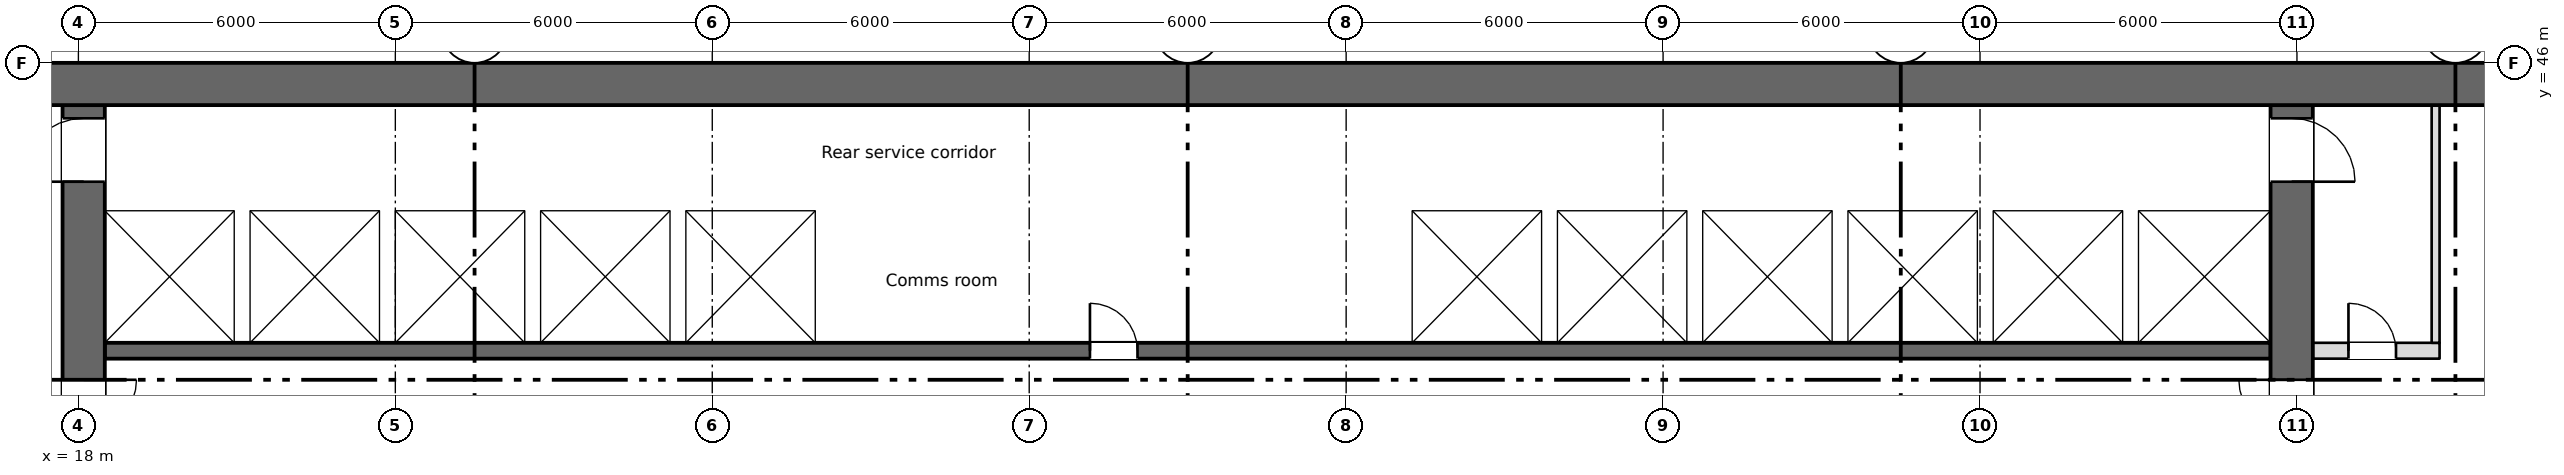
"""IFC4 building model, lengths in metres.
Left out: names, types, materials, properties, quantities, classifications, styles, units other than length and angle.
Written with IfcOpenShell. Run it as: python <this file> out.ifc"""

import sys

from ifc_helpers import new_model, si_unit, direction, frame, frame_2d, origin, place, context, subcontext, project, spatial, rectangle, extrude, element, fill, save


model = new_model("IFC4")
c1 = context("Model", 3, precision=1e-05, world=origin(), true_north=direction((0.0, 1.0)))
c2 = subcontext(c1, "Body", "Model", "MODEL_VIEW")
j1 = project(units=[si_unit("LENGTHUNIT", "METRE"), si_unit("PLANEANGLEUNIT", "RADIAN")], contexts=[c1])
p1 = place(None, origin())
s1 = spatial("IfcSite", under=j1, at=p1, CompositionType="ELEMENT")
p2 = place(p1, origin())
s2 = spatial("IfcBuilding", under=s1, at=p2, CompositionType="ELEMENT")
p3 = place(p2, frame((0.0, 0.0, 147.5)))
s3 = spatial("IfcBuildingStorey", under=s2, at=p3, CompositionType="ELEMENT", Elevation=147.5)
p4 = place(p3, frame((5.55, 45.6, 0.0), z_axis=(0.0, 0.0, 1.0), x_axis=(1.0, 0.0, 0.0)))
e1 = element("IfcWall", 1, at=p4, inside=s3, PredefinedType="SHEAR", context=c2, shape_type="SweptSolid", body=[
    extrude(rectangle(XDim=60.9, YDim=0.8, at=frame_2d((30.45, 0.0))), origin(), (0.0, 0.0, 1.0), 3.35),
])
p5 = place(p4, frame((1.2, 0.0, 0.6)))
e2 = element("IfcOpeningElement", 2, at=p5, cuts=e1, PredefinedType="OPENING", context=c2, shape_type="SweptSolid", body=[
    extrude(rectangle(XDim=0.6, YDim=2.4, at=frame_2d((0.3, 1.2))), frame((0.0, 0.41, 0.0), z_axis=(0.0, -1.0, 0.0), x_axis=(1.0, 0.0, 0.0)), (0.0, 0.0, 1.0), 0.82),
])
p6 = place(p4, frame((7.2, 0.0, 0.6)))
e3 = element("IfcOpeningElement", 3, at=p6, cuts=e1, PredefinedType="OPENING", context=c2, shape_type="SweptSolid", body=[
    extrude(rectangle(XDim=0.6, YDim=2.4, at=frame_2d((0.3, 1.2))), frame((0.0, 0.41, 0.0), z_axis=(0.0, -1.0, 0.0), x_axis=(1.0, 0.0, 0.0)), (0.0, 0.0, 1.0), 0.82),
])
p7 = place(p3, frame((18.1, 28.4, 0.0), z_axis=(0.0, 0.0, 1.0), x_axis=(0.0, 1.0, 0.0)))
e4 = element("IfcWall", 4, at=p7, inside=s3, PredefinedType="SHEAR", context=c2, shape_type="SweptSolid", body=[
    extrude(rectangle(XDim=16.8, YDim=0.8, at=frame_2d((8.4, 0.0))), origin(), (0.0, 0.0, 1.0), 3.35),
])
p8 = place(p7, frame((9.6, 0.0, 0.0)))
e5 = element("IfcOpeningElement", 5, at=p8, cuts=e4, PredefinedType="OPENING", context=c2, shape_type="SweptSolid", body=[
    extrude(rectangle(XDim=2.0, YDim=2.1, at=frame_2d((1.0, 1.05))), frame((0.0, 0.41, 0.0), z_axis=(0.0, -1.0, 0.0), x_axis=(1.0, 0.0, 0.0)), (0.0, 0.0, 1.0), 0.82),
])
p9 = place(p7, frame((15.35, 0.0, 0.0)))
e6 = element("IfcOpeningElement", 6, at=p9, cuts=e4, PredefinedType="OPENING", context=c2, shape_type="SweptSolid", body=[
    extrude(rectangle(XDim=1.2, YDim=2.1, at=frame_2d((0.6, 1.05))), frame((0.0, 0.41, 0.0), z_axis=(0.0, -1.0, 0.0), x_axis=(1.0, 0.0, 0.0)), (0.0, 0.0, 1.0), 0.82),
])
p10 = place(p3, frame((59.9, 28.4, 0.0), z_axis=(0.0, 0.0, 1.0), x_axis=(0.0, 1.0, 0.0)))
e7 = element("IfcWall", 7, at=p10, inside=s3, PredefinedType="SHEAR", context=c2, shape_type="SweptSolid", body=[
    extrude(rectangle(XDim=16.8, YDim=0.8, at=frame_2d((8.4, 0.0))), origin(), (0.0, 0.0, 1.0), 3.35),
])
p11 = place(p10, frame((9.6, 0.0, 0.0)))
e8 = element("IfcOpeningElement", 8, at=p11, cuts=e7, PredefinedType="OPENING", context=c2, shape_type="SweptSolid", body=[
    extrude(rectangle(XDim=2.0, YDim=2.1, at=frame_2d((1.0, 1.05))), frame((0.0, 0.41, 0.0), z_axis=(0.0, -1.0, 0.0), x_axis=(1.0, 0.0, 0.0)), (0.0, 0.0, 1.0), 0.82),
])
p12 = place(p10, frame((15.35, 0.0, 0.0)))
e9 = element("IfcOpeningElement", 9, at=p12, cuts=e7, PredefinedType="OPENING", context=c2, shape_type="SweptSolid", body=[
    extrude(rectangle(XDim=1.2, YDim=2.1, at=frame_2d((0.6, 1.05))), frame((0.0, 0.41, 0.0), z_axis=(0.0, -1.0, 0.0), x_axis=(1.0, 0.0, 0.0)), (0.0, 0.0, 1.0), 0.82),
])
p13 = place(p3, frame((18.5, 40.55, 0.0), z_axis=(0.0, 0.0, 1.0), x_axis=(1.0, 0.0, 0.0)))
e10 = element("IfcWall", 10, at=p13, inside=s3, PredefinedType="SHEAR", context=c2, shape_type="SweptSolid", body=[
    extrude(rectangle(XDim=41.0, YDim=0.3, at=frame_2d((20.5, 0.0))), origin(), (0.0, 0.0, 1.0), 3.35),
])
p14 = place(p13, frame((18.65, 0.0, 0.0)))
e11 = element("IfcOpeningElement", 11, at=p14, cuts=e10, PredefinedType="OPENING", context=c2, shape_type="SweptSolid", body=[
    extrude(rectangle(XDim=0.9, YDim=2.1, at=frame_2d((0.45, 1.05))), frame((0.0, 0.16, 0.0), z_axis=(0.0, -1.0, 0.0), x_axis=(1.0, 0.0, 0.0)), (0.0, 0.0, 1.0), 0.32),
])
p15 = place(p13, frame((6.175, 0.0, 0.0)))
e12 = element("IfcOpeningElement", 12, at=p15, cuts=e10, PredefinedType="OPENING", context=c2, shape_type="SweptSolid", body=[
    extrude(rectangle(XDim=1.1, YDim=2.1, at=frame_2d((0.55, 1.05))), frame((0.0, 0.16, 0.0), z_axis=(0.0, -1.0, 0.0), x_axis=(1.0, 0.0, 0.0)), (0.0, 0.0, 1.0), 0.32),
])
p16 = place(p13, frame((8.925, 0.0, 0.0)))
e13 = element("IfcOpeningElement", 13, at=p16, cuts=e10, PredefinedType="OPENING", context=c2, shape_type="SweptSolid", body=[
    extrude(rectangle(XDim=1.1, YDim=2.1, at=frame_2d((0.55, 1.05))), frame((0.0, 0.16, 0.0), z_axis=(0.0, -1.0, 0.0), x_axis=(1.0, 0.0, 0.0)), (0.0, 0.0, 1.0), 0.32),
])
p17 = place(p13, frame((11.675, 0.0, 0.0)))
e14 = element("IfcOpeningElement", 14, at=p17, cuts=e10, PredefinedType="OPENING", context=c2, shape_type="SweptSolid", body=[
    extrude(rectangle(XDim=1.1, YDim=2.1, at=frame_2d((0.55, 1.05))), frame((0.0, 0.16, 0.0), z_axis=(0.0, -1.0, 0.0), x_axis=(1.0, 0.0, 0.0)), (0.0, 0.0, 1.0), 0.32),
])
p18 = place(p13, frame((30.925, 0.0, 0.0)))
e15 = element("IfcOpeningElement", 15, at=p18, cuts=e10, PredefinedType="OPENING", context=c2, shape_type="SweptSolid", body=[
    extrude(rectangle(XDim=1.1, YDim=2.1, at=frame_2d((0.55, 1.05))), frame((0.0, 0.16, 0.0), z_axis=(0.0, -1.0, 0.0), x_axis=(1.0, 0.0, 0.0)), (0.0, 0.0, 1.0), 0.32),
])
p19 = place(p13, frame((33.675, 0.0, 0.0)))
e16 = element("IfcOpeningElement", 16, at=p19, cuts=e10, PredefinedType="OPENING", context=c2, shape_type="SweptSolid", body=[
    extrude(rectangle(XDim=1.1, YDim=2.1, at=frame_2d((0.55, 1.05))), frame((0.0, 0.16, 0.0), z_axis=(0.0, -1.0, 0.0), x_axis=(1.0, 0.0, 0.0)), (0.0, 0.0, 1.0), 0.32),
])
p20 = place(p13, frame((36.375, 0.0, 0.0)))
e17 = element("IfcOpeningElement", 17, at=p20, cuts=e10, PredefinedType="OPENING", context=c2, shape_type="SweptSolid", body=[
    extrude(rectangle(XDim=1.2, YDim=2.1, at=frame_2d((0.6, 1.05))), frame((0.0, 0.16, 0.0), z_axis=(0.0, -1.0, 0.0), x_axis=(1.0, 0.0, 0.0)), (0.0, 0.0, 1.0), 0.32),
])
p21 = place(p13, frame((39.15, 0.0, 0.0)))
e18 = element("IfcOpeningElement", 18, at=p21, cuts=e10, PredefinedType="OPENING", context=c2, shape_type="SweptSolid", body=[
    extrude(rectangle(XDim=1.2, YDim=2.1, at=frame_2d((0.6, 1.05))), frame((0.0, 0.16, 0.0), z_axis=(0.0, -1.0, 0.0), x_axis=(1.0, 0.0, 0.0)), (0.0, 0.0, 1.0), 0.32),
])
p22 = place(p3, frame((18.5, 43.35, 0.0), z_axis=(0.0, 0.0, 1.0), x_axis=(1.0, 0.0, 0.0)))
e19 = element("IfcWall", 19, at=p22, inside=s3, PredefinedType="SHEAR", context=c2, shape_type="SweptSolid", body=[
    extrude(rectangle(XDim=41.0, YDim=0.3, at=frame_2d((20.5, 0.0))), origin(), (0.0, 0.0, 1.0), 3.35),
])
p23 = place(p3, frame((60.3, 40.55, 0.0), z_axis=(0.0, 0.0, 1.0), x_axis=(1.0, 0.0, 0.0)))
e20 = element("IfcWall", 20, at=p23, inside=s3, PredefinedType="PARTITIONING", context=c2, shape_type="SweptSolid", body=[
    extrude(rectangle(XDim=2.4, YDim=0.3, at=frame_2d((1.2, 0.0))), origin(), (0.0, 0.0, 1.0), 3.35),
])
p24 = place(p23, frame((0.675, 0.0, 0.0)))
e21 = element("IfcOpeningElement", 21, at=p24, cuts=e20, PredefinedType="OPENING", context=c2, shape_type="SweptSolid", body=[
    extrude(rectangle(XDim=0.9, YDim=2.1, at=frame_2d((0.45, 1.05))), frame((0.0, 0.16, 0.0), z_axis=(0.0, -1.0, 0.0), x_axis=(1.0, 0.0, 0.0)), (0.0, 0.0, 1.0), 0.32),
])
for number, where, z_axis, x_axis in (
    (22, (21.1, 40.7, 0.0), (0.0, 0.0, 1.0), (0.0, 1.0, 0.0)),
    (23, (23.85, 40.7, 0.0), (0.0, 0.0, 1.0), (0.0, 1.0, 0.0)),
    (24, (26.6, 40.7, 0.0), (0.0, 0.0, 1.0), (0.0, 1.0, 0.0)),
    (25, (29.35, 40.7, 0.0), (0.0, 0.0, 1.0), (0.0, 1.0, 0.0)),
    (26, (32.1, 40.7, 0.0), (0.0, 0.0, 1.0), (0.0, 1.0, 0.0)),
    (27, (43.1, 40.7, 0.0), (0.0, 0.0, 1.0), (0.0, 1.0, 0.0)),
    (28, (45.85, 40.7, 0.0), (0.0, 0.0, 1.0), (0.0, 1.0, 0.0)),
    (29, (48.6, 40.7, 0.0), (0.0, 0.0, 1.0), (0.0, 1.0, 0.0)),
    (30, (51.35, 40.7, 0.0), (0.0, 0.0, 1.0), (0.0, 1.0, 0.0)),
    (31, (54.1, 40.7, 0.0), (0.0, 0.0, 1.0), (0.0, 1.0, 0.0)),
    (32, (56.85, 40.7, 0.0), (0.0, 0.0, 1.0), (0.0, 1.0, 0.0)),
):
    element("IfcWall", number, at=place(p3, frame(where, z_axis=z_axis, x_axis=x_axis)), inside=s3, PredefinedType="SHEAR", context=c2, shape_type="SweptSolid", body=[
        extrude(rectangle(XDim=2.5, YDim=0.3, at=frame_2d((1.25, 0.0))), origin(), (0.0, 0.0, 1.0), 3.35),
    ])
p25 = place(p3, frame((62.625, 40.7, 0.0), z_axis=(0.0, 0.0, 1.0), x_axis=(0.0, 1.0, 0.0)))
e33 = element("IfcWall", 33, at=p25, inside=s3, PredefinedType="PARTITIONING", context=c2, shape_type="SweptSolid", body=[
    extrude(rectangle(XDim=4.5, YDim=0.15, at=frame_2d((2.25, 0.0))), origin(), (0.0, 0.0, 1.0), 3.35),
])
p26 = place(p24, origin())
e34 = element("IfcDoor", 34, at=p26, inside=s3, OperationType="SINGLE_SWING_LEFT", PredefinedType="DOOR", context=c2, shape_type="SweptSolid", body=[
    extrude(rectangle(XDim=0.9, YDim=2.1, at=frame_2d((0.45, 1.05))), frame((0.0, 0.025, 0.0), z_axis=(0.0, -1.0, 0.0), x_axis=(1.0, 0.0, 0.0)), (0.0, 0.0, 1.0), 0.05),
])
fill(e21, e34)
p27 = place(p14, origin())
e35 = element("IfcDoor", 35, at=p27, inside=s3, OperationType="SINGLE_SWING_LEFT", PredefinedType="DOOR", context=c2, shape_type="SweptSolid", body=[
    extrude(rectangle(XDim=0.9, YDim=2.1, at=frame_2d((0.45, 1.05))), frame((0.0, 0.025, 0.0), z_axis=(0.0, -1.0, 0.0), x_axis=(1.0, 0.0, 0.0)), (0.0, 0.0, 1.0), 0.05),
])
fill(e11, e35)
p28 = place(p15, origin())
e36 = element("IfcDoor", 36, at=p28, inside=s3, OperationType="SLIDING_TO_LEFT", PredefinedType="DOOR", context=c2, shape_type="SweptSolid", body=[
    extrude(rectangle(XDim=1.1, YDim=2.1, at=frame_2d((0.55, 1.05))), frame((0.0, 0.025, 0.0), z_axis=(0.0, -1.0, 0.0), x_axis=(1.0, 0.0, 0.0)), (0.0, 0.0, 1.0), 0.05),
])
fill(e12, e36)
p29 = place(p16, origin())
e37 = element("IfcDoor", 37, at=p29, inside=s3, OperationType="SLIDING_TO_LEFT", PredefinedType="DOOR", context=c2, shape_type="SweptSolid", body=[
    extrude(rectangle(XDim=1.1, YDim=2.1, at=frame_2d((0.55, 1.05))), frame((0.0, 0.025, 0.0), z_axis=(0.0, -1.0, 0.0), x_axis=(1.0, 0.0, 0.0)), (0.0, 0.0, 1.0), 0.05),
])
fill(e13, e37)
p30 = place(p17, origin())
e38 = element("IfcDoor", 38, at=p30, inside=s3, OperationType="SLIDING_TO_LEFT", PredefinedType="DOOR", context=c2, shape_type="SweptSolid", body=[
    extrude(rectangle(XDim=1.1, YDim=2.1, at=frame_2d((0.55, 1.05))), frame((0.0, 0.025, 0.0), z_axis=(0.0, -1.0, 0.0), x_axis=(1.0, 0.0, 0.0)), (0.0, 0.0, 1.0), 0.05),
])
fill(e14, e38)
p31 = place(p18, origin())
e39 = element("IfcDoor", 39, at=p31, inside=s3, OperationType="SLIDING_TO_LEFT", PredefinedType="DOOR", context=c2, shape_type="SweptSolid", body=[
    extrude(rectangle(XDim=1.1, YDim=2.1, at=frame_2d((0.55, 1.05))), frame((0.0, 0.025, 0.0), z_axis=(0.0, -1.0, 0.0), x_axis=(1.0, 0.0, 0.0)), (0.0, 0.0, 1.0), 0.05),
])
fill(e15, e39)
p32 = place(p19, origin())
e40 = element("IfcDoor", 40, at=p32, inside=s3, OperationType="SLIDING_TO_LEFT", PredefinedType="DOOR", context=c2, shape_type="SweptSolid", body=[
    extrude(rectangle(XDim=1.1, YDim=2.1, at=frame_2d((0.55, 1.05))), frame((0.0, 0.025, 0.0), z_axis=(0.0, -1.0, 0.0), x_axis=(1.0, 0.0, 0.0)), (0.0, 0.0, 1.0), 0.05),
])
fill(e16, e40)
p33 = place(p20, origin())
e41 = element("IfcDoor", 41, at=p33, inside=s3, OperationType="SLIDING_TO_LEFT", PredefinedType="DOOR", context=c2, shape_type="SweptSolid", body=[
    extrude(rectangle(XDim=1.2, YDim=2.1, at=frame_2d((0.6, 1.05))), frame((0.0, 0.025, 0.0), z_axis=(0.0, -1.0, 0.0), x_axis=(1.0, 0.0, 0.0)), (0.0, 0.0, 1.0), 0.05),
])
fill(e17, e41)
p34 = place(p21, origin())
e42 = element("IfcDoor", 42, at=p34, inside=s3, OperationType="SLIDING_TO_LEFT", PredefinedType="DOOR", context=c2, shape_type="SweptSolid", body=[
    extrude(rectangle(XDim=1.2, YDim=2.1, at=frame_2d((0.6, 1.05))), frame((0.0, 0.025, 0.0), z_axis=(0.0, -1.0, 0.0), x_axis=(1.0, 0.0, 0.0)), (0.0, 0.0, 1.0), 0.05),
])
fill(e18, e42)
p35 = place(p8, origin())
e43 = element("IfcDoor", 43, at=p35, inside=s3, OperationType="DOUBLE_DOOR_SINGLE_SWING", PredefinedType="DOOR", context=c2, shape_type="SweptSolid", body=[
    extrude(rectangle(XDim=2.0, YDim=2.1, at=frame_2d((1.0, 1.05))), frame((0.0, 0.025, 0.0), z_axis=(0.0, -1.0, 0.0), x_axis=(1.0, 0.0, 0.0)), (0.0, 0.0, 1.0), 0.05),
])
fill(e5, e43)
p36 = place(p11, origin())
e44 = element("IfcDoor", 44, at=p36, inside=s3, OperationType="DOUBLE_DOOR_SINGLE_SWING", PredefinedType="DOOR", context=c2, shape_type="SweptSolid", body=[
    extrude(rectangle(XDim=2.0, YDim=2.1, at=frame_2d((1.0, 1.05))), frame((0.0, 0.025, 0.0), z_axis=(0.0, -1.0, 0.0), x_axis=(1.0, 0.0, 0.0)), (0.0, 0.0, 1.0), 0.05),
])
fill(e8, e44)
p37 = place(p9, origin())
e45 = element("IfcDoor", 45, at=p37, inside=s3, OperationType="SINGLE_SWING_LEFT", PredefinedType="DOOR", context=c2, shape_type="SweptSolid", body=[
    extrude(rectangle(XDim=1.2, YDim=2.1, at=frame_2d((0.6, 1.05))), frame((0.0, 0.025, 0.0), z_axis=(0.0, -1.0, 0.0), x_axis=(1.0, 0.0, 0.0)), (0.0, 0.0, 1.0), 0.05),
])
fill(e6, e45)
p38 = place(p12, origin())
e46 = element("IfcDoor", 46, at=p38, inside=s3, OperationType="SINGLE_SWING_LEFT", PredefinedType="DOOR", context=c2, shape_type="SweptSolid", body=[
    extrude(rectangle(XDim=1.2, YDim=2.1, at=frame_2d((0.6, 1.05))), frame((0.0, 0.025, 0.0), z_axis=(0.0, -1.0, 0.0), x_axis=(1.0, 0.0, 0.0)), (0.0, 0.0, 1.0), 0.05),
])
fill(e9, e46)
save(model, sys.argv[1])
